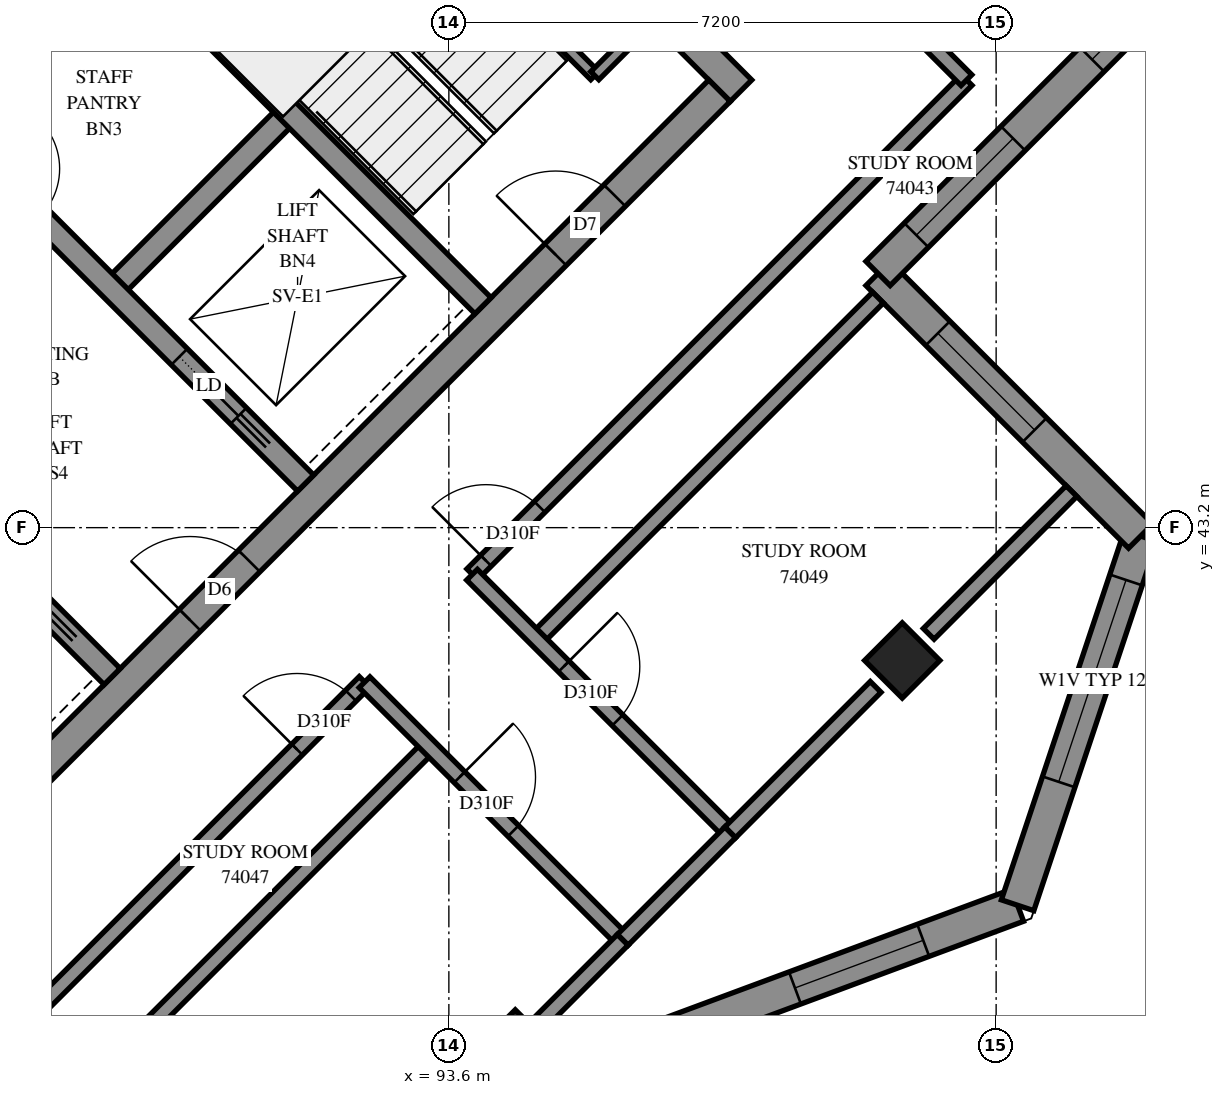
"""IFC4 building model, lengths in metres.
Left out: names, types, materials, properties, quantities, classifications, styles, units other than length and angle.
Written with IfcOpenShell. Run it as: python <this file> out.ifc"""

import sys

from ifc_helpers import new_model, si_unit, direction, frame, frame_2d, origin, origin_2d, place, context, subcontext, project, spatial, polyline, rectangle, outline, extrude, element, fill, save


model = new_model("IFC4")
c1 = context("Model", 3, precision=1e-05, world=origin(), true_north=direction((0.0, 1.0)))
c2 = subcontext(c1, "Body", "Model", "MODEL_VIEW")
j1 = project(units=[si_unit("LENGTHUNIT", "METRE"), si_unit("PLANEANGLEUNIT", "RADIAN")], contexts=[c1])
p1 = place(None, origin())
s1 = spatial("IfcSite", under=j1, at=p1, CompositionType="ELEMENT")
p2 = place(p1, origin())
s2 = spatial("IfcBuilding", under=s1, at=p2, CompositionType="ELEMENT")
p3 = place(p2, frame((0.0, 0.0, 271.0)))
s3 = spatial("IfcBuildingStorey", under=s2, at=p3, CompositionType="ELEMENT", Elevation=271.0)
for number, where, z_axis, x_axis in (
    (1, (99.565, 41.453, 0.0), (0.0, 0.0, 1.0), (0.707, -0.707, 0.0)),
    (2, (94.474, 36.362, 0.0), (0.0, 0.0, 1.0), (0.707, -0.707, 0.0)),
):
    element("IfcColumn", number, at=place(p3, frame(where, z_axis=z_axis, x_axis=x_axis)), inside=s3, PredefinedType="COLUMN", context=c2, shape_type="SweptSolid", body=[
        extrude(rectangle(XDim=0.7, YDim=0.7, at=origin_2d()), origin(), (0.0, 0.0, 1.0), 3.1),
    ])
p4 = place(p3, frame((86.695, 59.696, -0.3), z_axis=(0.0, 0.0, 1.0), x_axis=(0.7071100706, -0.7071034917, 0.0)))
e3 = element("IfcWall", 3, at=p4, inside=s3, PredefinedType="SHEAR", context=c2, shape_type="SweptSolid", body=[
    extrude(rectangle(XDim=15.2, YDim=0.4, at=frame_2d((7.6, 0.0))), origin(), (0.0, 0.0, 1.0), 2.7),
])
p5 = place(p4, frame((10.4, 0.0, 0.3)))
e4 = element("IfcOpeningElement", 4, at=p5, cuts=e3, PredefinedType="OPENING", context=c2, shape_type="SweptSolid", body=[
    extrude(rectangle(XDim=0.8, YDim=2.1, at=frame_2d((0.4, 1.05))), frame((0.0, 0.21, 0.0), z_axis=(0.0, -1.0, 0.0), x_axis=(1.0, 0.0, 0.0)), (0.0, 0.0, 1.0), 0.42),
])
p6 = place(p3, frame((86.978, 38.766, -0.3), z_axis=(0.0, 0.0, 1.0), x_axis=(0.7071067812, 0.7071067812, 0.0)))
e5 = element("IfcWall", 5, at=p6, inside=s3, PredefinedType="SHEAR", context=c2, shape_type="SweptSolid", body=[
    extrude(rectangle(XDim=14.4, YDim=0.4, at=frame_2d((7.2, 0.0))), origin(), (0.0, 0.0, 1.0), 2.7),
])
p7 = place(p6, frame((4.55, 0.0, 0.3)))
e6 = element("IfcOpeningElement", 6, at=p7, cuts=e5, PredefinedType="OPENING", context=c2, shape_type="SweptSolid", body=[
    extrude(rectangle(XDim=1.1, YDim=2.1, at=frame_2d((0.55, 1.05))), frame((0.0, 0.21, 0.0), z_axis=(0.0, -1.0, 0.0), x_axis=(1.0, 0.0, 0.0)), (0.0, 0.0, 1.0), 0.42),
])
p8 = place(p6, frame((11.35, 0.0, 0.3)))
e7 = element("IfcOpeningElement", 7, at=p8, cuts=e5, PredefinedType="OPENING", context=c2, shape_type="SweptSolid", body=[
    extrude(rectangle(XDim=1.1, YDim=2.1, at=frame_2d((0.55, 1.05))), frame((0.0, 0.21, 0.0), z_axis=(0.0, -1.0, 0.0), x_axis=(1.0, 0.0, 0.0)), (0.0, 0.0, 1.0), 0.42),
])
for number, where, z_axis, x_axis in (
    (8, (86.625, 48.878, 0.0), (0.0, 0.0, 1.0), (0.707, 0.707, 0.0)),
    (9, (89.17, 46.332, 0.0), (0.0, 0.0, 1.0), (0.707, 0.707, 0.0)),
):
    element("IfcWall", number, at=place(p3, frame(where, z_axis=z_axis, x_axis=x_axis)), inside=s3, PredefinedType="SOLIDWALL", context=c2, shape_type="SweptSolid", body=[
        extrude(rectangle(XDim=3.3, YDim=0.3, at=frame_2d((1.65, 0.0))), origin(), (0.0, 0.0, 1.0), 3.1),
    ])
p9 = place(p3, frame((78.988, 51.423, 0.0), z_axis=(0.0, 0.0, 1.0), x_axis=(0.7071067812, -0.7071067812, 0.0)))
e10 = element("IfcWall", 10, at=p9, inside=s3, PredefinedType="SOLIDWALL", context=c2, shape_type="SweptSolid", body=[
    extrude(rectangle(XDim=14.4, YDim=0.3, at=frame_2d((7.2, 0.0))), origin(), (0.0, 0.0, 1.0), 3.1),
])
p10 = place(p9, frame((1.35, 0.0, 0.0)))
e11 = element("IfcOpeningElement", 11, at=p10, cuts=e10, PredefinedType="OPENING", context=c2, shape_type="SweptSolid", body=[
    extrude(rectangle(XDim=0.9, YDim=2.1, at=frame_2d((0.45, 1.05))), frame((0.0, 0.16, 0.0), z_axis=(0.0, -1.0, 0.0), x_axis=(1.0, 0.0, 0.0)), (0.0, 0.0, 1.0), 0.32),
])
p11 = place(p9, frame((4.95, 0.0, 0.0)))
e12 = element("IfcOpeningElement", 12, at=p11, cuts=e10, PredefinedType="OPENING", context=c2, shape_type="SweptSolid", body=[
    extrude(rectangle(XDim=0.9, YDim=2.1, at=frame_2d((0.45, 1.05))), frame((0.0, 0.16, 0.0), z_axis=(0.0, -1.0, 0.0), x_axis=(1.0, 0.0, 0.0)), (0.0, 0.0, 1.0), 0.32),
])
p12 = place(p9, frame((8.55, 0.0, 0.0)))
e13 = element("IfcOpeningElement", 13, at=p12, cuts=e10, PredefinedType="OPENING", context=c2, shape_type="SweptSolid", body=[
    extrude(rectangle(XDim=0.9, YDim=2.1, at=frame_2d((0.45, 1.05))), frame((0.0, 0.16, 0.0), z_axis=(0.0, -1.0, 0.0), x_axis=(1.0, 0.0, 0.0)), (0.0, 0.0, 1.0), 0.32),
])
p13 = place(p9, frame((12.05, 0.0, 0.0)))
e14 = element("IfcOpeningElement", 14, at=p13, cuts=e10, PredefinedType="OPENING", context=c2, shape_type="SweptSolid", body=[
    extrude(rectangle(XDim=1.1, YDim=2.1, at=frame_2d((0.55, 1.05))), frame((0.0, 0.16, 0.0), z_axis=(0.0, -1.0, 0.0), x_axis=(1.0, 0.0, 0.0)), (0.0, 0.0, 1.0), 0.32),
])
p14 = place(p3, frame((81.534, 53.969, 0.0), z_axis=(0.0, 0.0, 1.0), x_axis=(0.707103309, -0.7071102534, 0.0)))
e15 = element("IfcWall", 15, at=p14, inside=s3, PredefinedType="SOLIDWALL", context=c2, shape_type="SweptSolid", body=[
    extrude(rectangle(XDim=14.4, YDim=0.3, at=frame_2d((7.2, 0.0))), origin(), (0.0, 0.0, 1.0), 3.1),
])
p15 = place(p14, frame((8.55, 0.0, 0.0)))
e16 = element("IfcOpeningElement", 16, at=p15, cuts=e15, PredefinedType="OPENING", context=c2, shape_type="SweptSolid", body=[
    extrude(rectangle(XDim=0.9, YDim=2.1, at=frame_2d((0.45, 1.05))), frame((0.0, 0.16, 0.0), z_axis=(0.0, -1.0, 0.0), x_axis=(1.0, 0.0, 0.0)), (0.0, 0.0, 1.0), 0.32),
])
p16 = place(p14, frame((1.25, 0.0, 0.0)))
e17 = element("IfcOpeningElement", 17, at=p16, cuts=e15, PredefinedType="OPENING", context=c2, shape_type="SweptSolid", body=[
    extrude(rectangle(XDim=1.1, YDim=2.1, at=frame_2d((0.55, 1.05))), frame((0.0, 0.16, 0.0), z_axis=(0.0, -1.0, 0.0), x_axis=(1.0, 0.0, 0.0)), (0.0, 0.0, 1.0), 0.32),
])
p17 = place(p14, frame((4.85, 0.0, 0.0)))
e18 = element("IfcOpeningElement", 18, at=p17, cuts=e15, PredefinedType="OPENING", context=c2, shape_type="SweptSolid", body=[
    extrude(rectangle(XDim=1.1, YDim=2.1, at=frame_2d((0.55, 1.05))), frame((0.0, 0.16, 0.0), z_axis=(0.0, -1.0, 0.0), x_axis=(1.0, 0.0, 0.0)), (0.0, 0.0, 1.0), 0.32),
])
p18 = place(p14, frame((12.05, 0.0, 0.0)))
e19 = element("IfcOpeningElement", 19, at=p18, cuts=e15, PredefinedType="OPENING", context=c2, shape_type="SweptSolid", body=[
    extrude(rectangle(XDim=1.1, YDim=2.1, at=frame_2d((0.55, 1.05))), frame((0.0, 0.16, 0.0), z_axis=(0.0, -1.0, 0.0), x_axis=(1.0, 0.0, 0.0)), (0.0, 0.0, 1.0), 0.32),
])
p19 = place(p3, frame((88.958, 51.211, 0.0), z_axis=(0.0, 0.0, 1.0), x_axis=(0.7070998367, -0.7071137256, 0.0)))
e20 = element("IfcWall", 20, at=p19, inside=s3, PredefinedType="SOLIDWALL", context=c2, shape_type="SweptSolid", body=[
    extrude(rectangle(XDim=7.2, YDim=0.3, at=frame_2d((3.6, 0.0))), origin(), (0.0, 0.0, 1.0), 3.1),
])
p20 = place(p3, frame((96.137, 36.395, 0.0), z_axis=(0.0, 0.0, 1.0), x_axis=(0.937429161, 0.3481760591, 0.0)))
e21 = element("IfcWall", 21, at=p20, inside=s3, PredefinedType="SOLIDWALL", context=c2, shape_type="SweptSolid", body=[
    extrude(outline(polyline([(0.103, -0.225), (5.383, -0.225), (5.168, 0.225), (-0.103, 0.225), (0.103, -0.225)])), origin(), (0.0, 0.0, 1.0), 3.1),
])
p21 = place(p20, frame((2.151, 0.0, 0.6)))
e22 = element("IfcOpeningElement", 22, at=p21, cuts=e21, PredefinedType="OPENING", context=c2, shape_type="SweptSolid", body=[
    extrude(rectangle(XDim=1.8, YDim=1.9, at=frame_2d((0.9, 0.95))), frame((0.0, 0.235, 0.0), z_axis=(0.0, -1.0, 0.0), x_axis=(1.0, 0.0, 0.0)), (0.0, 0.0, 1.0), 0.47),
])
p22 = place(p3, frame((101.082, 38.232, 0.0), z_axis=(0.0, 0.0, 1.0), x_axis=(0.316227766, 0.9486832981, 0.0)))
e23 = element("IfcWall", 23, at=p22, inside=s3, PredefinedType="SOLIDWALL", context=c2, shape_type="SweptSolid", body=[
    extrude(outline(polyline([(-0.108, -0.225), (5.259, -0.225), (4.981, 0.225), (0.108, 0.225), (-0.108, -0.225)])), origin(), (0.0, 0.0, 1.0), 3.1),
])
p23 = place(p22, frame((1.711, 0.0, 0.45)))
e24 = element("IfcOpeningElement", 24, at=p23, cuts=e23, PredefinedType="OPENING", context=c2, shape_type="SweptSolid", body=[
    extrude(rectangle(XDim=2.8, YDim=2.55, at=frame_2d((1.4, 1.275))), frame((0.0, 0.235, 0.0), z_axis=(0.0, -1.0, 0.0), x_axis=(1.0, 0.0, 0.0)), (0.0, 0.0, 1.0), 0.47),
])
p24 = place(p3, frame((102.701, 43.089, 0.0), z_axis=(0.0, 0.0, 1.0), x_axis=(-0.7070965479, 0.7071170144, 0.0)))
e25 = element("IfcWall", 25, at=p24, inside=s3, PredefinedType="SOLIDWALL", context=c2, shape_type="SweptSolid", body=[
    extrude(outline(polyline([(-0.139, -0.225), (4.661, -0.225), (5.111, 0.225), (0.139, 0.225), (-0.139, -0.225)])), origin(), (0.0, 0.0, 1.0), 3.1),
])
p25 = place(p24, frame((1.974, 0.0, 0.6)))
e26 = element("IfcOpeningElement", 26, at=p25, cuts=e25, PredefinedType="OPENING", context=c2, shape_type="SweptSolid", body=[
    extrude(rectangle(XDim=1.8, YDim=1.9, at=frame_2d((0.9, 0.95))), frame((0.0, 0.235, 0.0), z_axis=(0.0, -1.0, 0.0), x_axis=(1.0, 0.0, 0.0)), (0.0, 0.0, 1.0), 0.47),
])
p26 = place(p3, frame((99.246, 46.544, 0.0), z_axis=(0.0, 0.0, 1.0), x_axis=(0.7071067812, 0.7071067812, 0.0)))
e27 = element("IfcWall", 27, at=p26, inside=s3, PredefinedType="SOLIDWALL", context=c2, shape_type="SweptSolid", body=[
    extrude(outline(polyline([(0.225, -0.225), (6.167, -0.225), (5.537, 0.225), (-0.225, 0.225), (0.225, -0.225)])), origin(), (0.0, 0.0, 1.0), 3.1),
])
p27 = place(p26, frame((0.713, 0.0, 0.6)))
e28 = element("IfcOpeningElement", 28, at=p27, cuts=e27, PredefinedType="OPENING", context=c2, shape_type="SweptSolid", body=[
    extrude(rectangle(XDim=1.8, YDim=1.9, at=frame_2d((0.9, 0.95))), frame((0.0, 0.235, 0.0), z_axis=(0.0, -1.0, 0.0), x_axis=(1.0, 0.0, 0.0)), (0.0, 0.0, 1.0), 0.47),
])
p28 = place(p26, frame((3.981, 0.0, 0.6)))
e29 = element("IfcOpeningElement", 29, at=p28, cuts=e27, PredefinedType="OPENING", context=c2, shape_type="SweptSolid", body=[
    extrude(rectangle(XDim=1.2, YDim=1.9, at=frame_2d((0.6, 0.95))), frame((0.0, 0.235, 0.0), z_axis=(0.0, -1.0, 0.0), x_axis=(1.0, 0.0, 0.0)), (0.0, 0.0, 1.0), 0.47),
])
p29 = place(p3, frame((91.313, 53.354, 0.0), z_axis=(0.0, 0.0, 1.0), x_axis=(0.7071067812, -0.7071067812, 0.0)))
e30 = element("IfcWall", 30, at=p29, inside=s3, PredefinedType="PARTITIONING", context=c2, shape_type="SweptSolid", body=[
    extrude(rectangle(XDim=5.95, YDim=0.15, at=frame_2d((2.975, 0.0))), origin(), (0.0, 0.0, 1.0), 3.1),
])
p30 = place(p3, frame((95.52, 49.146, 0.0), z_axis=(0.0, 0.0, 1.0), x_axis=(0.7071067812, 0.7071067812, 0.0)))
e31 = element("IfcWall", 31, at=p30, inside=s3, PredefinedType="PARTITIONING", context=c2, shape_type="SweptSolid", body=[
    extrude(rectangle(XDim=1.02, YDim=0.15, at=frame_2d((0.51, 0.0))), origin(), (0.0, 0.0, 1.0), 3.1),
])
p31 = place(p3, frame((84.97, 31.951, 0.0), z_axis=(0.0, 0.0, 1.0), x_axis=(0.7071025578, 0.7071110045, 0.0)))
e32 = element("IfcWall", 32, at=p31, inside=s3, PredefinedType="PARTITIONING", context=c2, shape_type="SweptSolid", body=[
    extrude(rectangle(XDim=11.839, YDim=0.2, at=frame_2d((5.92, 0.0))), origin(), (0.0, 0.0, 1.0), 3.1),
])
p32 = place(p3, frame((93.908, 42.586, 0.0), z_axis=(0.0, 0.0, 1.0), x_axis=(0.7071067812, 0.7071067812, 0.0)))
e33 = element("IfcWall", 33, at=p32, inside=s3, PredefinedType="PARTITIONING", context=c2, shape_type="SweptSolid", body=[
    extrude(rectangle(XDim=9.198, YDim=0.2, at=frame_2d((4.599, 0.0))), origin(), (0.0, 0.0, 1.0), 3.1),
])
p33 = place(p32, frame((0.254, 0.0, 0.0)))
e34 = element("IfcOpeningElement", 34, at=p33, cuts=e33, PredefinedType="OPENING", context=c2, shape_type="SweptSolid", body=[
    extrude(rectangle(XDim=1.0, YDim=2.1, at=frame_2d((0.5, 1.05))), frame((0.0, 0.11, 0.0), z_axis=(0.0, -1.0, 0.0), x_axis=(1.0, 0.0, 0.0)), (0.0, 0.0, 1.0), 0.22),
])
p34 = place(p3, frame((86.836, 35.514, 0.0), z_axis=(0.0, 0.0, 1.0), x_axis=(0.7071067812, 0.7071067812, 0.0)))
e35 = element("IfcWall", 35, at=p34, inside=s3, PredefinedType="PARTITIONING", context=c2, shape_type="SweptSolid", body=[
    extrude(rectangle(XDim=7.999, YDim=0.2, at=frame_2d((3.999, 0.0))), origin(), (0.0, 0.0, 1.0), 3.1),
])
p35 = place(p34, frame((6.742, 0.0, 0.0)))
e36 = element("IfcOpeningElement", 36, at=p35, cuts=e35, PredefinedType="OPENING", context=c2, shape_type="SweptSolid", body=[
    extrude(rectangle(XDim=1.0, YDim=2.1, at=frame_2d((0.5, 1.05))), frame((0.0, 0.11, 0.0), z_axis=(0.0, -1.0, 0.0), x_axis=(1.0, 0.0, 0.0)), (0.0, 0.0, 1.0), 0.22),
])
p36 = place(p3, frame((95.419, 54.077, 0.0), z_axis=(0.0, 0.0, 1.0), x_axis=(0.7071067812, -0.7071067812, 0.0)))
e37 = element("IfcWall", 37, at=p36, inside=s3, PredefinedType="PARTITIONING", context=c2, shape_type="SweptSolid", body=[
    extrude(rectangle(XDim=7.057, YDim=0.2, at=frame_2d((3.528, 0.0))), origin(), (0.0, 0.0, 1.0), 3.1),
])
p37 = place(p3, frame((94.755, 41.737, 0.0), z_axis=(0.0, 0.0, 1.0), x_axis=(0.7071146549, 0.7070989073, 0.0)))
e38 = element("IfcWall", 38, at=p37, inside=s3, PredefinedType="PARTITIONING", context=c2, shape_type="SweptSolid", body=[
    extrude(rectangle(XDim=6.35, YDim=0.2, at=frame_2d((3.175, 0.0))), origin(), (0.0, 0.0, 1.0), 3.1),
])
p38 = place(p3, frame((93.905, 42.581, 0.0), z_axis=(0.0, 0.0, 1.0), x_axis=(0.7071067812, -0.7071067812, 0.0)))
e39 = element("IfcWall", 39, at=p38, inside=s3, PredefinedType="PARTITIONING", context=c2, shape_type="SweptSolid", body=[
    extrude(rectangle(XDim=4.8, YDim=0.2, at=frame_2d((2.4, 0.0))), origin(), (0.0, 0.0, 1.0), 3.1),
])
p39 = place(p38, frame((1.707, 0.0, 0.0)))
e40 = element("IfcOpeningElement", 40, at=p39, cuts=e39, PredefinedType="OPENING", context=c2, shape_type="SweptSolid", body=[
    extrude(rectangle(XDim=1.0, YDim=2.1, at=frame_2d((0.5, 1.05))), frame((0.0, 0.11, 0.0), z_axis=(0.0, -1.0, 0.0), x_axis=(1.0, 0.0, 0.0)), (0.0, 0.0, 1.0), 0.22),
])
p40 = place(p3, frame((92.491, 41.167, 0.0), z_axis=(0.0, 0.0, 1.0), x_axis=(0.7071067812, -0.7071067812, 0.0)))
e41 = element("IfcWall", 41, at=p40, inside=s3, PredefinedType="PARTITIONING", context=c2, shape_type="SweptSolid", body=[
    extrude(rectangle(XDim=4.8, YDim=0.2, at=frame_2d((2.4, 0.0))), origin(), (0.0, 0.0, 1.0), 3.1),
])
p41 = place(p40, frame((1.767, 0.0, 0.0)))
e42 = element("IfcOpeningElement", 42, at=p41, cuts=e41, PredefinedType="OPENING", context=c2, shape_type="SweptSolid", body=[
    extrude(rectangle(XDim=1.0, YDim=2.1, at=frame_2d((0.5, 1.05))), frame((0.0, 0.11, 0.0), z_axis=(0.0, -1.0, 0.0), x_axis=(1.0, 0.0, 0.0)), (0.0, 0.0, 1.0), 0.22),
])
p42 = place(p3, frame((97.301, 39.191, 0.0), z_axis=(0.0, 0.0, 1.0), x_axis=(0.7071067812, 0.7071067812, 0.0)))
e43 = element("IfcWall", 43, at=p42, inside=s3, PredefinedType="PARTITIONING", context=c2, shape_type="SweptSolid", body=[
    extrude(rectangle(XDim=2.707, YDim=0.2, at=frame_2d((1.353, 0.0))), origin(), (0.0, 0.0, 1.0), 2.6),
])
p43 = place(p3, frame((99.913, 41.803, 0.0), z_axis=(0.0, 0.0, 1.0), x_axis=(0.7071067812, 0.7071067812, 0.0)))
e44 = element("IfcWall", 44, at=p43, inside=s3, PredefinedType="PARTITIONING", context=c2, shape_type="SweptSolid", body=[
    extrude(rectangle(XDim=2.656, YDim=0.2, at=frame_2d((1.328, 0.0))), origin(), (0.0, 0.0, 1.0), 3.1),
])
p44 = place(p3, frame((95.887, 37.777, 0.0), z_axis=(0.0, 0.0, 1.0), x_axis=(0.7071067812, 0.7071067812, 0.0)))
e45 = element("IfcWall", 45, at=p44, inside=s3, PredefinedType="PARTITIONING", context=c2, shape_type="SweptSolid", body=[
    extrude(rectangle(XDim=2.0, YDim=0.2, at=frame_2d((1.0, 0.0))), origin(), (0.0, 0.0, 1.0), 2.6),
])
p45 = place(p3, frame((94.823, 36.713, 0.0), z_axis=(0.0, 0.0, 1.0), x_axis=(0.7071067812, 0.7071067812, 0.0)))
e46 = element("IfcWall", 46, at=p45, inside=s3, PredefinedType="PARTITIONING", context=c2, shape_type="SweptSolid", body=[
    extrude(rectangle(XDim=1.505, YDim=0.2, at=frame_2d((0.752, 0.0))), origin(), (0.0, 0.0, 1.0), 2.6),
])
p46 = place(p21, origin())
e47 = element("IfcWindow", 47, at=p46, inside=s3, PartitioningType="SINGLE_PANEL", PredefinedType="WINDOW", context=c2, shape_type="SweptSolid", body=[
    extrude(rectangle(XDim=1.8, YDim=1.9, at=frame_2d((0.9, 0.95))), frame((0.0, 0.205, 0.0), z_axis=(0.0, -1.0, 0.0), x_axis=(1.0, 0.0, 0.0)), (0.0, 0.0, 1.0), 0.06),
])
fill(e22, e47)
p47 = place(p23, origin())
e48 = element("IfcWindow", 48, at=p47, inside=s3, PartitioningType="SINGLE_PANEL", PredefinedType="WINDOW", context=c2, shape_type="SweptSolid", body=[
    extrude(rectangle(XDim=2.8, YDim=2.55, at=frame_2d((1.4, 1.275))), frame((0.0, 0.205, 0.0), z_axis=(0.0, -1.0, 0.0), x_axis=(1.0, 0.0, 0.0)), (0.0, 0.0, 1.0), 0.06),
])
fill(e24, e48)
p48 = place(p25, origin())
e49 = element("IfcWindow", 49, at=p48, inside=s3, PartitioningType="SINGLE_PANEL", PredefinedType="WINDOW", context=c2, shape_type="SweptSolid", body=[
    extrude(rectangle(XDim=1.8, YDim=1.9, at=frame_2d((0.9, 0.95))), frame((0.0, 0.205, 0.0), z_axis=(0.0, -1.0, 0.0), x_axis=(1.0, 0.0, 0.0)), (0.0, 0.0, 1.0), 0.06),
])
fill(e26, e49)
p49 = place(p27, origin())
e50 = element("IfcWindow", 50, at=p49, inside=s3, PartitioningType="SINGLE_PANEL", PredefinedType="WINDOW", context=c2, shape_type="SweptSolid", body=[
    extrude(rectangle(XDim=1.8, YDim=1.9, at=frame_2d((0.9, 0.95))), frame((0.0, 0.205, 0.0), z_axis=(0.0, -1.0, 0.0), x_axis=(1.0, 0.0, 0.0)), (0.0, 0.0, 1.0), 0.06),
])
fill(e28, e50)
p50 = place(p7, origin())
e51 = element("IfcDoor", 51, at=p50, inside=s3, OperationType="DOUBLE_DOOR_SINGLE_SWING", PredefinedType="DOOR", context=c2, shape_type="SweptSolid", body=[
    extrude(rectangle(XDim=1.1, YDim=2.1, at=frame_2d((0.55, 1.05))), frame((0.0, 0.025, 0.0), z_axis=(0.0, -1.0, 0.0), x_axis=(1.0, 0.0, 0.0)), (0.0, 0.0, 1.0), 0.05),
])
fill(e6, e51)
p51 = place(p8, origin())
e52 = element("IfcDoor", 52, at=p51, inside=s3, OperationType="SINGLE_SWING_RIGHT", PredefinedType="DOOR", context=c2, shape_type="SweptSolid", body=[
    extrude(rectangle(XDim=1.1, YDim=2.1, at=frame_2d((0.55, 1.05))), frame((0.0, 0.025, 0.0), z_axis=(0.0, -1.0, 0.0), x_axis=(1.0, 0.0, 0.0)), (0.0, 0.0, 1.0), 0.05),
])
fill(e7, e52)
p52 = place(p18, origin())
e53 = element("IfcDoor", 53, at=p52, inside=s3, OperationType="SLIDING_TO_RIGHT", PredefinedType="DOOR", context=c2, shape_type="SweptSolid", body=[
    extrude(rectangle(XDim=1.1, YDim=2.1, at=frame_2d((0.55, 1.05))), frame((0.0, 0.025, 0.0), z_axis=(0.0, -1.0, 0.0), x_axis=(1.0, 0.0, 0.0)), (0.0, 0.0, 1.0), 0.05),
])
fill(e19, e53)
p53 = place(p33, origin())
e54 = element("IfcDoor", 54, at=p53, inside=s3, OperationType="SINGLE_SWING_RIGHT", PredefinedType="DOOR", context=c2, shape_type="SweptSolid", body=[
    extrude(rectangle(XDim=1.0, YDim=2.1, at=frame_2d((0.5, 1.05))), frame((0.0, 0.025, 0.0), z_axis=(0.0, -1.0, 0.0), x_axis=(1.0, 0.0, 0.0)), (0.0, 0.0, 1.0), 0.05),
])
fill(e34, e54)
p54 = place(p35, origin())
e55 = element("IfcDoor", 55, at=p54, inside=s3, OperationType="SINGLE_SWING_RIGHT", PredefinedType="DOOR", context=c2, shape_type="SweptSolid", body=[
    extrude(rectangle(XDim=1.0, YDim=2.1, at=frame_2d((0.5, 1.05))), frame((0.0, 0.025, 0.0), z_axis=(0.0, -1.0, 0.0), x_axis=(1.0, 0.0, 0.0)), (0.0, 0.0, 1.0), 0.05),
])
fill(e36, e55)
p55 = place(p41, origin())
e56 = element("IfcDoor", 56, at=p55, inside=s3, OperationType="SINGLE_SWING_LEFT", PredefinedType="DOOR", context=c2, shape_type="SweptSolid", body=[
    extrude(rectangle(XDim=1.0, YDim=2.1, at=frame_2d((0.5, 1.05))), frame((0.0, 0.025, 0.0), z_axis=(0.0, -1.0, 0.0), x_axis=(1.0, 0.0, 0.0)), (0.0, 0.0, 1.0), 0.05),
])
fill(e42, e56)
p56 = place(p39, origin())
e57 = element("IfcDoor", 57, at=p56, inside=s3, OperationType="SINGLE_SWING_RIGHT", PredefinedType="DOOR", context=c2, shape_type="SweptSolid", body=[
    extrude(rectangle(XDim=1.0, YDim=2.1, at=frame_2d((0.5, 1.05))), frame((0.0, 0.025, 0.0), z_axis=(0.0, -1.0, 0.0), x_axis=(1.0, 0.0, 0.0)), (0.0, 0.0, 1.0), 0.05),
])
fill(e40, e57)
save(model, sys.argv[1])
